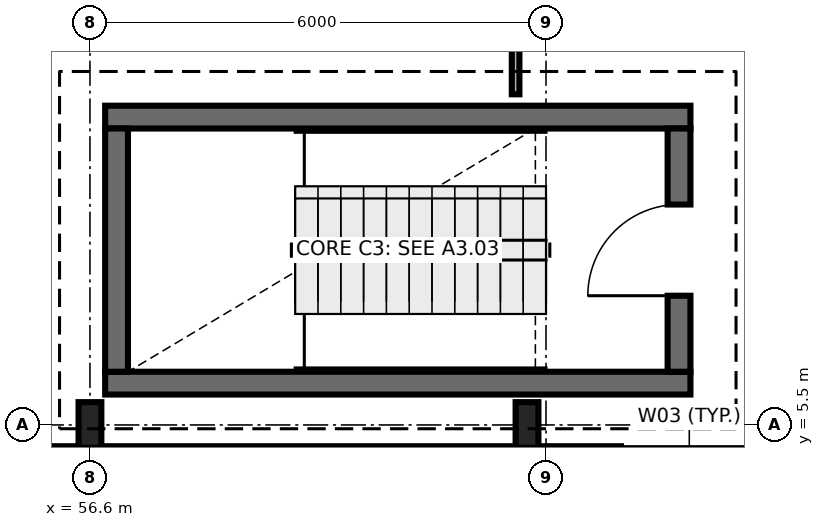
"""IFC4 building model, lengths in metres.
Left out: names, types, materials, properties, quantities, classifications, styles, units other than length and angle.
Written with IfcOpenShell. Run it as: python <this file> out.ifc"""

import sys

from ifc_helpers import new_model, si_unit, direction, frame, frame_2d, origin, origin_2d, place, context, subcontext, project, spatial, rectangle, i_section, extrude, element, fill, save


model = new_model("IFC4")
c1 = context("Model", 3, precision=1e-05, world=origin(), true_north=direction((0.0, 1.0)))
c2 = subcontext(c1, "Body", "Model", "MODEL_VIEW")
j1 = project(units=[si_unit("LENGTHUNIT", "METRE"), si_unit("PLANEANGLEUNIT", "RADIAN")], contexts=[c1])
p1 = place(None, origin())
s1 = spatial("IfcSite", under=j1, at=p1, CompositionType="ELEMENT")
p2 = place(p1, origin())
s2 = spatial("IfcBuilding", under=s1, at=p2, CompositionType="ELEMENT")
p3 = place(p2, frame((0.0, 0.0, 4.8)))
s3 = spatial("IfcBuildingStorey", under=s2, at=p3, CompositionType="ELEMENT", Elevation=4.8)
for number, where, z_axis, x_axis in (
    (1, (56.6, 5.5, 0.0), (0.0, 0.0, 1.0), (1.0, 0.0, 0.0)),
    (2, (62.35, 5.5, 0.0), (0.0, 0.0, 1.0), (1.0, 0.0, 0.0)),
):
    element("IfcColumn", number, at=place(p3, frame(where, z_axis=z_axis, x_axis=x_axis)), inside=s3, PredefinedType="COLUMN", context=c2, shape_type="SweptSolid", body=[
        extrude(i_section(OverallWidth=0.3, OverallDepth=0.6, WebThickness=0.015, FlangeThickness=0.03, FilletRadius=0.027, at=origin_2d()), origin(), (0.0, 0.0, 1.0), 4.5),
    ])
for number, where, z_axis, x_axis in (
    (3, (56.8, 6.05, 0.0), (0.0, 0.0, 1.0), (1.0, 0.0, 0.0)),
    (4, (64.5, 9.55, 0.0), (0.0, 0.0, 1.0), (-1.0, 0.0, 0.0)),
):
    element("IfcWall", number, at=place(p3, frame(where, z_axis=z_axis, x_axis=x_axis)), inside=s3, PredefinedType="SHEAR", context=c2, shape_type="SweptSolid", body=[
        extrude(rectangle(XDim=7.7, YDim=0.3, at=frame_2d((3.85, 0.0))), origin(), (0.0, 0.0, 1.0), 4.5),
    ])
p4 = place(p3, frame((56.95, 9.4, 0.0), z_axis=(0.0, 0.0, 1.0), x_axis=(0.0, -1.0, 0.0)))
e5 = element("IfcWall", 5, at=p4, inside=s3, PredefinedType="SHEAR", context=c2, shape_type="SweptSolid", body=[
    extrude(rectangle(XDim=3.2, YDim=0.3, at=frame_2d((1.6, 0.0))), origin(), (0.0, 0.0, 1.0), 4.5),
])
p5 = place(p3, frame((64.35, 6.2, 0.0), z_axis=(0.0, 0.0, 1.0), x_axis=(0.0, 1.0, 0.0)))
e6 = element("IfcWall", 6, at=p5, inside=s3, PredefinedType="SHEAR", context=c2, shape_type="SweptSolid", body=[
    extrude(rectangle(XDim=3.2, YDim=0.3, at=frame_2d((1.6, 0.0))), origin(), (0.0, 0.0, 1.0), 4.5),
])
p6 = place(p5, frame((1.0, 0.0, 0.0)))
e7 = element("IfcOpeningElement", 7, at=p6, cuts=e6, PredefinedType="OPENING", context=c2, shape_type="SweptSolid", body=[
    extrude(rectangle(XDim=1.2, YDim=2.15, at=frame_2d((0.6, 1.075))), frame((0.0, 0.16, 0.0), z_axis=(0.0, -1.0, 0.0), x_axis=(1.0, 0.0, 0.0)), (0.0, 0.0, 1.0), 0.32),
])
p7 = place(p3, frame((55.002, 5.06, 0.0), z_axis=(0.0, 0.0, 1.0), x_axis=(1.0, 0.0, 0.0)))
e8 = element("IfcWall", 8, at=p7, inside=s3, PredefinedType="SHEAR", context=c2, shape_type="SweptSolid", body=[
    extrude(rectangle(XDim=12.299, YDim=0.32, at=frame_2d((6.149, 0.0))), origin(), (0.0, 0.0, 1.0), 4.25),
])
p8 = place(p7, frame((8.583, 0.0, 0.9)))
e9 = element("IfcOpeningElement", 9, at=p8, cuts=e8, PredefinedType="OPENING", context=c2, shape_type="SweptSolid", body=[
    extrude(rectangle(XDim=1.8, YDim=1.8, at=frame_2d((0.9, 0.9))), frame((0.0, 0.17, 0.0), z_axis=(0.0, -1.0, 0.0), x_axis=(1.0, 0.0, 0.0)), (0.0, 0.0, 1.0), 0.34),
])
p9 = place(p3, frame((62.2, 9.85, 0.0), z_axis=(0.0, 0.0, 1.0), x_axis=(0.0, 1.0, 0.0)))
e10 = element("IfcWall", 10, at=p9, inside=s3, PredefinedType="PARTITIONING", context=c2, shape_type="SweptSolid", body=[
    extrude(rectangle(XDim=31.4, YDim=0.1, at=frame_2d((15.7, 0.0))), origin(), (0.0, 0.0, 1.0), 4.25),
])
p10 = place(p9, frame((9.753, 0.0, 0.0)))
e11 = element("IfcOpeningElement", 11, at=p10, cuts=e10, PredefinedType="OPENING", context=c2, shape_type="SweptSolid", body=[
    extrude(rectangle(XDim=0.95, YDim=2.1, at=frame_2d((0.475, 1.05))), frame((0.0, 0.06, 0.0), z_axis=(0.0, -1.0, 0.0), x_axis=(1.0, 0.0, 0.0)), (0.0, 0.0, 1.0), 0.12),
])
p11 = place(p9, frame((21.837, 0.0, 0.0)))
e12 = element("IfcOpeningElement", 12, at=p11, cuts=e10, PredefinedType="OPENING", context=c2, shape_type="SweptSolid", body=[
    extrude(rectangle(XDim=1.1, YDim=2.15, at=frame_2d((0.55, 1.075))), frame((0.0, 0.06, 0.0), z_axis=(0.0, -1.0, 0.0), x_axis=(1.0, 0.0, 0.0)), (0.0, 0.0, 1.0), 0.12),
])
p12 = place(p6, origin())
e13 = element("IfcDoor", 13, at=p12, inside=s3, OperationType="SINGLE_SWING_LEFT", PredefinedType="DOOR", context=c2, shape_type="SweptSolid", body=[
    extrude(rectangle(XDim=1.2, YDim=2.15, at=frame_2d((0.6, 1.075))), frame((0.0, 0.025, 0.0), z_axis=(0.0, -1.0, 0.0), x_axis=(1.0, 0.0, 0.0)), (0.0, 0.0, 1.0), 0.05),
])
fill(e7, e13)
save(model, sys.argv[1])
